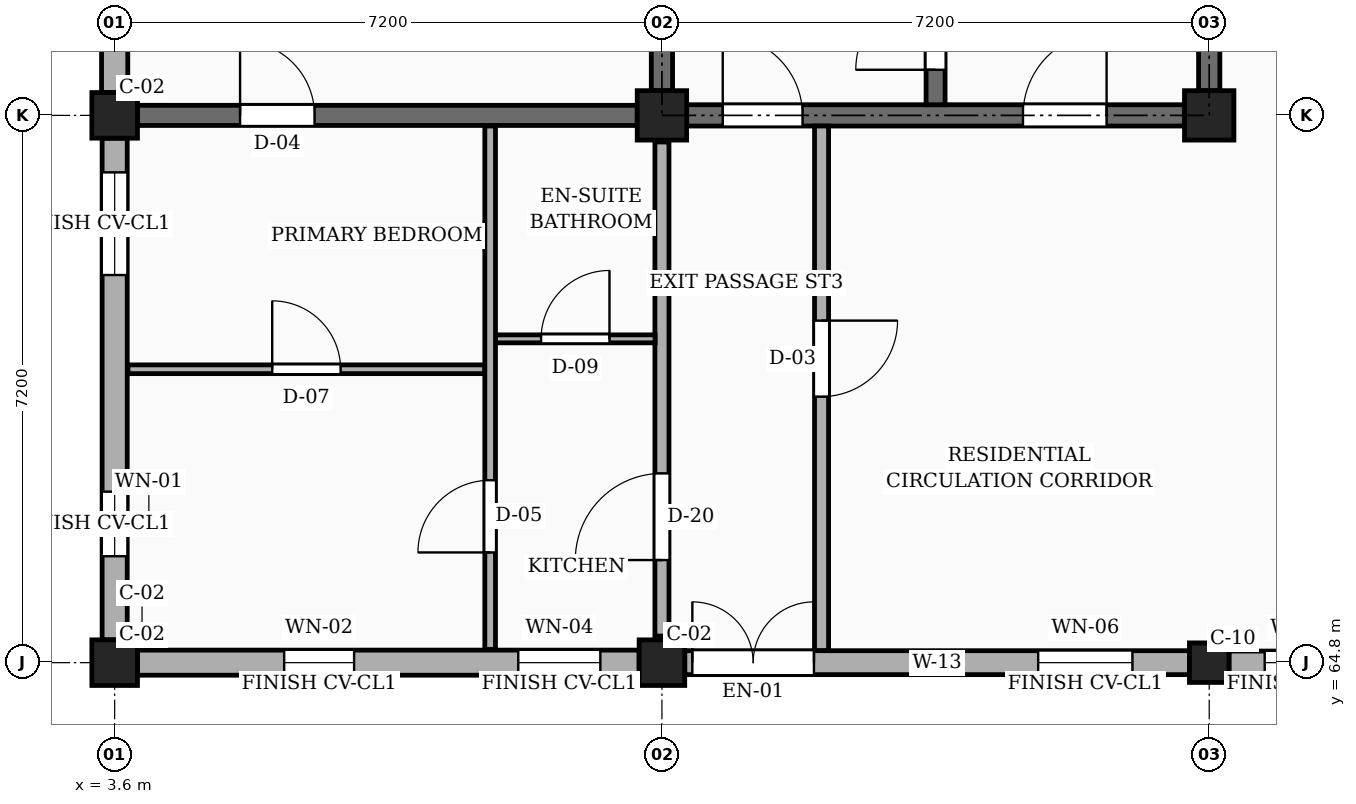
"""IFC4 building model, lengths in metres.
Left out: names, types, materials, properties, quantities, classifications, styles, units other than length and angle.
Written with IfcOpenShell. Run it as: python <this file> out.ifc"""

import sys

from ifc_helpers import new_model, si_unit, direction, frame, frame_2d, origin, origin_2d, place, context, subcontext, project, spatial, rectangle, circle, extrude, element, fill, save


model = new_model("IFC4")
c1 = context("Model", 3, precision=1e-05, world=origin(), true_north=direction((0.0, 1.0)))
c2 = subcontext(c1, "Body", "Model", "MODEL_VIEW")
j1 = project(units=[si_unit("LENGTHUNIT", "METRE"), si_unit("PLANEANGLEUNIT", "RADIAN")], contexts=[c1])
p1 = place(None, origin())
s1 = spatial("IfcSite", under=j1, at=p1, CompositionType="ELEMENT")
p2 = place(p1, origin())
s2 = spatial("IfcBuilding", under=s1, at=p2, CompositionType="ELEMENT")
p3 = place(p2, origin())
s3 = spatial("IfcBuildingStorey", under=s2, at=p3, CompositionType="ELEMENT", Elevation=0.0)
for number, where, z_axis, x_axis in (
    (1, (3.6, 64.8, 0.0), (0.0, 0.0, 1.0), (1.0, 0.0, 0.0)),
    (2, (3.6, 72.0, 0.0), (0.0, 0.0, 1.0), (1.0, 0.0, 0.0)),
    (3, (10.8, 64.8, 0.0), (0.0, 0.0, 1.0), (1.0, 0.0, 0.0)),
):
    element("IfcColumn", number, at=place(p3, frame(where, z_axis=z_axis, x_axis=x_axis)), inside=s3, PredefinedType="COLUMN", context=c2, shape_type="SweptSolid", body=[
        extrude(rectangle(XDim=0.6, YDim=0.6, at=origin_2d()), origin(), (0.0, 0.0, 1.0), 4.5),
    ])
p4 = place(p3, frame((10.8, 72.0, 0.0), z_axis=(0.0, 0.0, 1.0), x_axis=(1.0, 0.0, 0.0)))
e4 = element("IfcColumn", 4, at=p4, inside=s3, PredefinedType="COLUMN", context=c2, shape_type="SweptSolid", body=[
    extrude(rectangle(XDim=0.65, YDim=0.65, at=origin_2d()), origin(), (0.0, 0.0, 1.0), 4.5),
])
p5 = place(p3, frame((18.0, 64.8, 0.0), z_axis=(0.0, 0.0, 1.0), x_axis=(1.0, 0.0, 0.0)))
e5 = element("IfcColumn", 5, at=p5, inside=s3, PredefinedType="COLUMN", context=c2, shape_type="SweptSolid", body=[
    extrude(circle(Radius=0.26, at=origin_2d()), origin(), (0.0, 0.0, 1.0), 4.5),
])
p6 = place(p3, frame((18.0, 72.0, 0.0), z_axis=(0.0, 0.0, 1.0), x_axis=(1.0, 0.0, 0.0)))
e6 = element("IfcColumn", 6, at=p6, inside=s3, PredefinedType="COLUMN", context=c2, shape_type="SweptSolid", body=[
    extrude(rectangle(XDim=0.65, YDim=0.65, at=origin_2d()), origin(), (0.0, 0.0, 1.0), 4.5),
])
p7 = place(p3, frame((3.9, 72.0, 0.0), z_axis=(0.0, 0.0, 1.0), x_axis=(1.0, 0.0, 0.0)))
e7 = element("IfcWall", 7, at=p7, inside=s3, PredefinedType="SOLIDWALL", context=c2, shape_type="SweptSolid", body=[
    extrude(rectangle(XDim=6.575, YDim=0.265, at=frame_2d((3.288, 0.0))), origin(), (0.0, 0.0, 1.0), 3.56),
])
p8 = place(p7, frame((1.35, 0.0, 0.0)))
e8 = element("IfcOpeningElement", 8, at=p8, cuts=e7, PredefinedType="OPENING", context=c2, shape_type="SweptSolid", body=[
    extrude(rectangle(XDim=0.98, YDim=2.12, at=frame_2d((0.49, 1.06))), frame((0.0, 0.143, 0.0), z_axis=(0.0, -1.0, 0.0), x_axis=(1.0, 0.0, 0.0)), (0.0, 0.0, 1.0), 0.285),
])
p9 = place(p3, frame((3.9, 64.8, 0.0), z_axis=(0.0, 0.0, 1.0), x_axis=(1.0, 0.0, 0.0)))
e9 = element("IfcWall", 9, at=p9, inside=s3, PredefinedType="SOLIDWALL", context=c2, shape_type="SweptSolid", body=[
    extrude(rectangle(XDim=6.6, YDim=0.33, at=frame_2d((3.3, 0.0))), origin(), (0.0, 0.0, 1.0), 3.83),
])
p10 = place(p9, frame((1.93, 0.0, 0.78)))
e10 = element("IfcOpeningElement", 10, at=p10, cuts=e9, PredefinedType="OPENING", context=c2, shape_type="SweptSolid", body=[
    extrude(rectangle(XDim=0.92, YDim=1.15, at=frame_2d((0.46, 0.575))), frame((0.0, 0.175, 0.0), z_axis=(0.0, -1.0, 0.0), x_axis=(1.0, 0.0, 0.0)), (0.0, 0.0, 1.0), 0.35),
])
p11 = place(p9, frame((5.01, 0.0, 0.78)))
e11 = element("IfcOpeningElement", 11, at=p11, cuts=e9, PredefinedType="OPENING", context=c2, shape_type="SweptSolid", body=[
    extrude(rectangle(XDim=1.08, YDim=1.15, at=frame_2d((0.54, 0.575))), frame((0.0, 0.175, 0.0), z_axis=(0.0, -1.0, 0.0), x_axis=(1.0, 0.0, 0.0)), (0.0, 0.0, 1.0), 0.35),
])
p12 = place(p3, frame((11.1, 64.8, 0.0), z_axis=(0.0, 0.0, 1.0), x_axis=(1.0, 0.0, 0.0)))
e12 = element("IfcWall", 12, at=p12, inside=s3, PredefinedType="SOLIDWALL", context=c2, shape_type="SweptSolid", body=[
    extrude(rectangle(XDim=6.64, YDim=0.315, at=frame_2d((3.32, 0.0))), origin(), (0.0, 0.0, 1.0), 3.83),
])
p13 = place(p12, frame((4.65, 0.0, 0.78)))
e13 = element("IfcOpeningElement", 13, at=p13, cuts=e12, PredefinedType="OPENING", context=c2, shape_type="SweptSolid", body=[
    extrude(rectangle(XDim=1.24, YDim=1.15, at=frame_2d((0.62, 0.575))), frame((0.0, 0.167, 0.0), z_axis=(0.0, -1.0, 0.0), x_axis=(1.0, 0.0, 0.0)), (0.0, 0.0, 1.0), 0.335),
])
p14 = place(p12, frame((0.1, 0.0, 0.0)))
e14 = element("IfcOpeningElement", 14, at=p14, cuts=e12, PredefinedType="OPENING", context=c2, shape_type="SweptSolid", body=[
    extrude(rectangle(XDim=1.6, YDim=2.25, at=frame_2d((0.8, 1.125))), frame((0.0, 0.167, 0.0), z_axis=(0.0, -1.0, 0.0), x_axis=(1.0, 0.0, 0.0)), (0.0, 0.0, 1.0), 0.335),
])
p15 = place(p3, frame((18.26, 64.8, 0.0), z_axis=(0.0, 0.0, 1.0), x_axis=(1.0, 0.0, 0.0)))
e15 = element("IfcWall", 15, at=p15, inside=s3, PredefinedType="SOLIDWALL", context=c2, shape_type="SweptSolid", body=[
    extrude(rectangle(XDim=6.64, YDim=0.305, at=frame_2d((3.32, 0.0))), origin(), (0.0, 0.0, 1.0), 3.83),
])
p16 = place(p15, frame((0.47, 0.0, 0.78)))
e16 = element("IfcOpeningElement", 16, at=p16, cuts=e15, PredefinedType="OPENING", context=c2, shape_type="SweptSolid", body=[
    extrude(rectangle(XDim=1.04, YDim=1.26, at=frame_2d((0.52, 0.63))), frame((0.0, 0.163, 0.0), z_axis=(0.0, -1.0, 0.0), x_axis=(1.0, 0.0, 0.0)), (0.0, 0.0, 1.0), 0.325),
])
p17 = place(p15, frame((3.47, 0.0, 0.78)))
e17 = element("IfcOpeningElement", 17, at=p17, cuts=e15, PredefinedType="OPENING", context=c2, shape_type="SweptSolid", body=[
    extrude(rectangle(XDim=1.4, YDim=1.15, at=frame_2d((0.7, 0.575))), frame((0.0, 0.163, 0.0), z_axis=(0.0, -1.0, 0.0), x_axis=(1.0, 0.0, 0.0)), (0.0, 0.0, 1.0), 0.325),
])
p18 = place(p3, frame((3.6, 78.94, 0.0), z_axis=(0.0, 0.0, 1.0), x_axis=(0.0, -1.0, 0.0)))
e18 = element("IfcWall", 18, at=p18, inside=s3, PredefinedType="SOLIDWALL", context=c2, shape_type="SweptSolid", body=[
    extrude(rectangle(XDim=6.64, YDim=0.345, at=frame_2d((3.32, 0.0))), origin(), (0.0, 0.0, 1.0), 3.83),
])
p19 = place(p18, frame((0.45, 0.0, 0.78)))
e19 = element("IfcOpeningElement", 19, at=p19, cuts=e18, PredefinedType="OPENING", context=c2, shape_type="SweptSolid", body=[
    extrude(rectangle(XDim=1.15, YDim=1.44, at=frame_2d((0.575, 0.72))), frame((0.0, 0.183, 0.0), z_axis=(0.0, -1.0, 0.0), x_axis=(1.0, 0.0, 0.0)), (0.0, 0.0, 1.0), 0.365),
])
p20 = place(p18, frame((4.65, 0.0, 0.78)))
e20 = element("IfcOpeningElement", 20, at=p20, cuts=e18, PredefinedType="OPENING", context=c2, shape_type="SweptSolid", body=[
    extrude(rectangle(XDim=1.35, YDim=1.44, at=frame_2d((0.675, 0.72))), frame((0.0, 0.183, 0.0), z_axis=(0.0, -1.0, 0.0), x_axis=(1.0, 0.0, 0.0)), (0.0, 0.0, 1.0), 0.365),
])
p21 = place(p3, frame((3.6, 71.7, 0.0), z_axis=(0.0, 0.0, 1.0), x_axis=(0.0, -1.0, 0.0)))
e21 = element("IfcWall", 21, at=p21, inside=s3, PredefinedType="SOLIDWALL", context=c2, shape_type="SweptSolid", body=[
    extrude(rectangle(XDim=6.6, YDim=0.33, at=frame_2d((3.3, 0.0))), origin(), (0.0, 0.0, 1.0), 3.83),
])
p22 = place(p21, frame((0.45, 0.0, 0.78)))
e22 = element("IfcOpeningElement", 22, at=p22, cuts=e21, PredefinedType="OPENING", context=c2, shape_type="SweptSolid", body=[
    extrude(rectangle(XDim=1.35, YDim=1.44, at=frame_2d((0.675, 0.72))), frame((0.0, 0.175, 0.0), z_axis=(0.0, -1.0, 0.0), x_axis=(1.0, 0.0, 0.0)), (0.0, 0.0, 1.0), 0.35),
])
p23 = place(p21, frame((4.65, 0.0, 0.78)))
e23 = element("IfcOpeningElement", 23, at=p23, cuts=e21, PredefinedType="OPENING", context=c2, shape_type="SweptSolid", body=[
    extrude(rectangle(XDim=0.85, YDim=1.15, at=frame_2d((0.425, 0.575))), frame((0.0, 0.175, 0.0), z_axis=(0.0, -1.0, 0.0), x_axis=(1.0, 0.0, 0.0)), (0.0, 0.0, 1.0), 0.35),
])
p24 = place(p3, frame((10.8, 72.325, 0.0), z_axis=(0.0, 0.0, 1.0), x_axis=(0.0, 1.0, 0.0)))
e24 = element("IfcWall", 24, at=p24, inside=s3, PredefinedType="SHEAR", context=c2, shape_type="SweptSolid", body=[
    extrude(rectangle(XDim=6.55, YDim=0.28, at=frame_2d((3.275, 0.0))), origin(), (0.0, 0.0, 1.0), 4.26),
])
p25 = place(p3, frame((18.0, 72.325, 0.0), z_axis=(0.0, 0.0, 1.0), x_axis=(0.0, 1.0, 0.0)))
e25 = element("IfcWall", 25, at=p25, inside=s3, PredefinedType="SHEAR", context=c2, shape_type="SweptSolid", body=[
    extrude(rectangle(XDim=6.55, YDim=0.28, at=frame_2d((3.275, 0.0))), origin(), (0.0, 0.0, 1.0), 4.26),
])
p26 = place(p25, frame((1.5, 0.0, 0.0)))
e26 = element("IfcOpeningElement", 26, at=p26, cuts=e25, PredefinedType="OPENING", context=c2, shape_type="SweptSolid", body=[
    extrude(rectangle(XDim=1.1, YDim=2.15, at=frame_2d((0.55, 1.075))), frame((0.0, 0.15, 0.0), z_axis=(0.0, -1.0, 0.0), x_axis=(1.0, 0.0, 0.0)), (0.0, 0.0, 1.0), 0.3),
])
p27 = place(p3, frame((11.125, 72.0, 0.0), z_axis=(0.0, 0.0, 1.0), x_axis=(1.0, 0.0, 0.0)))
e27 = element("IfcWall", 27, at=p27, inside=s3, PredefinedType="SHEAR", context=c2, shape_type="SweptSolid", body=[
    extrude(rectangle(XDim=6.55, YDim=0.28, at=frame_2d((3.275, 0.0))), origin(), (0.0, 0.0, 1.0), 4.26),
])
p28 = place(p27, frame((4.425, 0.0, 0.0)))
e28 = element("IfcOpeningElement", 28, at=p28, cuts=e27, PredefinedType="OPENING", context=c2, shape_type="SweptSolid", body=[
    extrude(rectangle(XDim=1.1, YDim=2.15, at=frame_2d((0.55, 1.075))), frame((0.0, 0.15, 0.0), z_axis=(0.0, -1.0, 0.0), x_axis=(1.0, 0.0, 0.0)), (0.0, 0.0, 1.0), 0.3),
])
p29 = place(p27, frame((0.475, 0.0, 0.0)))
e29 = element("IfcOpeningElement", 29, at=p29, cuts=e27, PredefinedType="OPENING", context=c2, shape_type="SweptSolid", body=[
    extrude(rectangle(XDim=1.05, YDim=2.15, at=frame_2d((0.525, 1.075))), frame((0.0, 0.15, 0.0), z_axis=(0.0, -1.0, 0.0), x_axis=(1.0, 0.0, 0.0)), (0.0, 0.0, 1.0), 0.3),
])
p30 = place(p3, frame((14.4, 72.14, 0.0), z_axis=(0.0, 0.0, 1.0), x_axis=(0.0, 1.0, 0.0)))
e30 = element("IfcWall", 30, at=p30, inside=s3, PredefinedType="SHEAR", context=c2, shape_type="SweptSolid", body=[
    extrude(rectangle(XDim=6.92, YDim=0.25, at=frame_2d((3.46, 0.0))), origin(), (0.0, 0.0, 1.0), 4.26),
])
p31 = place(p30, frame((0.46, 0.0, 0.0)))
e31 = element("IfcOpeningElement", 31, at=p31, cuts=e30, PredefinedType="OPENING", context=c2, shape_type="SweptSolid", body=[
    extrude(rectangle(XDim=1.05, YDim=2.15, at=frame_2d((0.525, 1.075))), frame((0.0, 0.135, 0.0), z_axis=(0.0, -1.0, 0.0), x_axis=(1.0, 0.0, 0.0)), (0.0, 0.0, 1.0), 0.27),
])
p32 = place(p3, frame((10.8, 65.15, 0.0), z_axis=(0.0, 0.0, 1.0), x_axis=(0.0, 1.0, 0.0)))
e32 = element("IfcWall", 32, at=p32, inside=s3, PredefinedType="PARTITIONING", context=c2, shape_type="SweptSolid", body=[
    extrude(rectangle(XDim=6.5, YDim=0.185, at=frame_2d((3.25, 0.0))), origin(), (0.0, 0.0, 1.0), 3.51),
])
p33 = place(p32, frame((1.0, 0.0, 0.0)))
e33 = element("IfcOpeningElement", 33, at=p33, cuts=e32, PredefinedType="OPENING", context=c2, shape_type="SweptSolid", body=[
    extrude(rectangle(XDim=1.14, YDim=2.18, at=frame_2d((0.57, 1.09))), frame((0.0, 0.103, 0.0), z_axis=(0.0, -1.0, 0.0), x_axis=(1.0, 0.0, 0.0)), (0.0, 0.0, 1.0), 0.205),
])
p34 = place(p3, frame((3.775, 68.66, 0.0), z_axis=(0.0, 0.0, 1.0), x_axis=(1.0, 0.0, 0.0)))
e34 = element("IfcWall", 34, at=p34, inside=s3, PredefinedType="PARTITIONING", context=c2, shape_type="SweptSolid", body=[
    extrude(rectangle(XDim=4.695, YDim=0.115, at=frame_2d((2.348, 0.0))), origin(), (0.0, 0.0, 1.0), 3.695),
])
p35 = place(p34, frame((1.897, 0.0, 0.0)))
e35 = element("IfcOpeningElement", 35, at=p35, cuts=e34, PredefinedType="OPENING", context=c2, shape_type="SweptSolid", body=[
    extrude(rectangle(XDim=0.9, YDim=2.1, at=frame_2d((0.45, 1.05))), frame((0.0, 0.067, 0.0), z_axis=(0.0, -1.0, 0.0), x_axis=(1.0, 0.0, 0.0)), (0.0, 0.0, 1.0), 0.135),
])
p36 = place(p3, frame((8.61, 69.06, 0.0), z_axis=(0.0, 0.0, 1.0), x_axis=(1.0, 0.0, 0.0)))
e36 = element("IfcWall", 36, at=p36, inside=s3, PredefinedType="PARTITIONING", context=c2, shape_type="SweptSolid", body=[
    extrude(rectangle(XDim=2.1, YDim=0.105, at=frame_2d((1.05, 0.0))), origin(), (0.0, 0.0, 1.0), 3.695),
])
p37 = place(p36, frame((0.6, 0.0, 0.0)))
e37 = element("IfcOpeningElement", 37, at=p37, cuts=e36, PredefinedType="OPENING", context=c2, shape_type="SweptSolid", body=[
    extrude(rectangle(XDim=0.9, YDim=2.05, at=frame_2d((0.45, 1.025))), frame((0.0, 0.062, 0.0), z_axis=(0.0, -1.0, 0.0), x_axis=(1.0, 0.0, 0.0)), (0.0, 0.0, 1.0), 0.125),
])
p38 = place(p3, frame((8.54, 64.975, 0.0), z_axis=(0.0, 0.0, 1.0), x_axis=(0.0, 1.0, 0.0)))
e38 = element("IfcWall", 38, at=p38, inside=s3, PredefinedType="PARTITIONING", context=c2, shape_type="SweptSolid", body=[
    extrude(rectangle(XDim=6.885, YDim=0.14, at=frame_2d((3.442, 0.0))), origin(), (0.0, 0.0, 1.0), 3.695),
])
p39 = place(p38, frame((1.275, 0.0, 0.0)))
e39 = element("IfcOpeningElement", 39, at=p39, cuts=e38, PredefinedType="OPENING", context=c2, shape_type="SweptSolid", body=[
    extrude(rectangle(XDim=0.95, YDim=2.1, at=frame_2d((0.475, 1.05))), frame((0.0, 0.08, 0.0), z_axis=(0.0, -1.0, 0.0), x_axis=(1.0, 0.0, 0.0)), (0.0, 0.0, 1.0), 0.16),
])
p40 = place(p3, frame((12.9, 71.86, 0.0), z_axis=(0.0, 0.0, 1.0), x_axis=(0.0, -1.0, 0.0)))
e40 = element("IfcWall", 40, at=p40, inside=s3, PredefinedType="PARTITIONING", context=c2, shape_type="SweptSolid", body=[
    extrude(rectangle(XDim=6.9, YDim=0.185, at=frame_2d((3.45, 0.0))), origin(), (0.0, 0.0, 1.0), 3.695),
])
p41 = place(p40, frame((2.56, 0.0, 0.0)))
e41 = element("IfcOpeningElement", 41, at=p41, cuts=e40, PredefinedType="OPENING", context=c2, shape_type="SweptSolid", body=[
    extrude(rectangle(XDim=1.0, YDim=2.15, at=frame_2d((0.5, 1.075))), frame((0.0, 0.103, 0.0), z_axis=(0.0, -1.0, 0.0), x_axis=(1.0, 0.0, 0.0)), (0.0, 0.0, 1.0), 0.205),
])
p42 = place(p10, origin())
e42 = element("IfcWindow", 42, at=p42, inside=s3, PartitioningType="SINGLE_PANEL", PredefinedType="WINDOW", context=c2, shape_type="SweptSolid", body=[
    extrude(rectangle(XDim=0.92, YDim=1.15, at=frame_2d((0.46, 0.575))), frame((0.0, 0.03, 0.0), z_axis=(0.0, -1.0, 0.0), x_axis=(1.0, 0.0, 0.0)), (0.0, 0.0, 1.0), 0.06),
])
fill(e10, e42)
p43 = place(p11, origin())
e43 = element("IfcWindow", 43, at=p43, inside=s3, PartitioningType="SINGLE_PANEL", PredefinedType="WINDOW", context=c2, shape_type="SweptSolid", body=[
    extrude(rectangle(XDim=1.08, YDim=1.15, at=frame_2d((0.54, 0.575))), frame((0.0, 0.03, 0.0), z_axis=(0.0, -1.0, 0.0), x_axis=(1.0, 0.0, 0.0)), (0.0, 0.0, 1.0), 0.06),
])
fill(e11, e43)
p44 = place(p13, origin())
e44 = element("IfcWindow", 44, at=p44, inside=s3, PartitioningType="SINGLE_PANEL", PredefinedType="WINDOW", context=c2, shape_type="SweptSolid", body=[
    extrude(rectangle(XDim=1.24, YDim=1.15, at=frame_2d((0.62, 0.575))), frame((0.0, 0.03, 0.0), z_axis=(0.0, -1.0, 0.0), x_axis=(1.0, 0.0, 0.0)), (0.0, 0.0, 1.0), 0.06),
])
fill(e13, e44)
p45 = place(p16, origin())
e45 = element("IfcWindow", 45, at=p45, inside=s3, PartitioningType="SINGLE_PANEL", PredefinedType="WINDOW", context=c2, shape_type="SweptSolid", body=[
    extrude(rectangle(XDim=1.04, YDim=1.26, at=frame_2d((0.52, 0.63))), frame((0.0, 0.03, 0.0), z_axis=(0.0, -1.0, 0.0), x_axis=(1.0, 0.0, 0.0)), (0.0, 0.0, 1.0), 0.06),
])
fill(e16, e45)
p46 = place(p22, origin())
e46 = element("IfcWindow", 46, at=p46, inside=s3, PartitioningType="SINGLE_PANEL", PredefinedType="WINDOW", context=c2, shape_type="SweptSolid", body=[
    extrude(rectangle(XDim=1.35, YDim=1.44, at=frame_2d((0.675, 0.72))), frame((0.0, 0.03, 0.0), z_axis=(0.0, -1.0, 0.0), x_axis=(1.0, 0.0, 0.0)), (0.0, 0.0, 1.0), 0.06),
])
fill(e22, e46)
p47 = place(p23, origin())
e47 = element("IfcWindow", 47, at=p47, inside=s3, PartitioningType="SINGLE_PANEL", PredefinedType="WINDOW", context=c2, shape_type="SweptSolid", body=[
    extrude(rectangle(XDim=0.85, YDim=1.15, at=frame_2d((0.425, 0.575))), frame((0.0, 0.03, 0.0), z_axis=(0.0, -1.0, 0.0), x_axis=(1.0, 0.0, 0.0)), (0.0, 0.0, 1.0), 0.06),
])
fill(e23, e47)
p48 = place(p28, frame((1.1, 0.0, 0.0), z_axis=(0.0, 0.0, 1.0), x_axis=(-1.0, 0.0, 0.0)))
e48 = element("IfcDoor", 48, at=p48, inside=s3, OperationType="SINGLE_SWING_RIGHT", PredefinedType="DOOR", context=c2, shape_type="SweptSolid", body=[
    extrude(rectangle(XDim=1.1, YDim=2.15, at=frame_2d((0.55, 1.075))), frame((0.0, 0.025, 0.0), z_axis=(0.0, -1.0, 0.0), x_axis=(1.0, 0.0, 0.0)), (0.0, 0.0, 1.0), 0.05),
])
fill(e28, e48)
p49 = place(p31, frame((1.05, 0.0, 0.0), z_axis=(0.0, 0.0, 1.0), x_axis=(-1.0, 0.0, 0.0)))
e49 = element("IfcDoor", 49, at=p49, inside=s3, OperationType="SINGLE_SWING_LEFT", PredefinedType="DOOR", context=c2, shape_type="SweptSolid", body=[
    extrude(rectangle(XDim=1.05, YDim=2.15, at=frame_2d((0.525, 1.075))), frame((0.0, 0.025, 0.0), z_axis=(0.0, -1.0, 0.0), x_axis=(1.0, 0.0, 0.0)), (0.0, 0.0, 1.0), 0.05),
])
fill(e31, e49)
p50 = place(p33, origin())
e50 = element("IfcDoor", 50, at=p50, inside=s3, OperationType="SINGLE_SWING_LEFT", PredefinedType="DOOR", context=c2, shape_type="SweptSolid", body=[
    extrude(rectangle(XDim=1.14, YDim=2.18, at=frame_2d((0.57, 1.09))), frame((0.0, 0.025, 0.0), z_axis=(0.0, -1.0, 0.0), x_axis=(1.0, 0.0, 0.0)), (0.0, 0.0, 1.0), 0.05),
])
fill(e33, e50)
p51 = place(p35, origin())
e51 = element("IfcDoor", 51, at=p51, inside=s3, OperationType="SINGLE_SWING_LEFT", PredefinedType="DOOR", context=c2, shape_type="SweptSolid", body=[
    extrude(rectangle(XDim=0.9, YDim=2.1, at=frame_2d((0.45, 1.05))), frame((0.0, 0.025, 0.0), z_axis=(0.0, -1.0, 0.0), x_axis=(1.0, 0.0, 0.0)), (0.0, 0.0, 1.0), 0.05),
])
fill(e35, e51)
p52 = place(p37, origin())
e52 = element("IfcDoor", 52, at=p52, inside=s3, OperationType="SINGLE_SWING_RIGHT", PredefinedType="DOOR", context=c2, shape_type="SweptSolid", body=[
    extrude(rectangle(XDim=0.9, YDim=2.05, at=frame_2d((0.45, 1.025))), frame((0.0, 0.025, 0.0), z_axis=(0.0, -1.0, 0.0), x_axis=(1.0, 0.0, 0.0)), (0.0, 0.0, 1.0), 0.05),
])
fill(e37, e52)
p53 = place(p39, origin())
e53 = element("IfcDoor", 53, at=p53, inside=s3, OperationType="SINGLE_SWING_LEFT", PredefinedType="DOOR", context=c2, shape_type="SweptSolid", body=[
    extrude(rectangle(XDim=0.95, YDim=2.1, at=frame_2d((0.475, 1.05))), frame((0.0, 0.025, 0.0), z_axis=(0.0, -1.0, 0.0), x_axis=(1.0, 0.0, 0.0)), (0.0, 0.0, 1.0), 0.05),
])
fill(e39, e53)
p54 = place(p8, origin())
e54 = element("IfcDoor", 54, at=p54, inside=s3, OperationType="SINGLE_SWING_LEFT", PredefinedType="DOOR", context=c2, shape_type="SweptSolid", body=[
    extrude(rectangle(XDim=0.98, YDim=2.12, at=frame_2d((0.49, 1.06))), frame((0.0, 0.025, 0.0), z_axis=(0.0, -1.0, 0.0), x_axis=(1.0, 0.0, 0.0)), (0.0, 0.0, 1.0), 0.05),
])
fill(e8, e54)
p55 = place(p29, frame((1.05, 0.0, 0.0), z_axis=(0.0, 0.0, 1.0), x_axis=(-1.0, 0.0, 0.0)))
e55 = element("IfcDoor", 55, at=p55, inside=s3, OperationType="SINGLE_SWING_LEFT", PredefinedType="DOOR", context=c2, shape_type="SweptSolid", body=[
    extrude(rectangle(XDim=1.05, YDim=2.15, at=frame_2d((0.525, 1.075))), frame((0.0, 0.025, 0.0), z_axis=(0.0, -1.0, 0.0), x_axis=(1.0, 0.0, 0.0)), (0.0, 0.0, 1.0), 0.05),
])
fill(e29, e55)
p56 = place(p14, frame((1.6, 0.0, 0.0), z_axis=(0.0, 0.0, 1.0), x_axis=(-1.0, 0.0, 0.0)))
e56 = element("IfcDoor", 56, at=p56, inside=s3, OperationType="DOUBLE_DOOR_SINGLE_SWING", PredefinedType="DOOR", context=c2, shape_type="SweptSolid", body=[
    extrude(rectangle(XDim=1.6, YDim=2.25, at=frame_2d((0.8, 1.125))), frame((0.0, 0.025, 0.0), z_axis=(0.0, -1.0, 0.0), x_axis=(1.0, 0.0, 0.0)), (0.0, 0.0, 1.0), 0.05),
])
fill(e14, e56)
p57 = place(p41, origin())
e57 = element("IfcDoor", 57, at=p57, inside=s3, OperationType="SINGLE_SWING_LEFT", PredefinedType="DOOR", context=c2, shape_type="SweptSolid", body=[
    extrude(rectangle(XDim=1.0, YDim=2.15, at=frame_2d((0.5, 1.075))), frame((0.0, 0.025, 0.0), z_axis=(0.0, -1.0, 0.0), x_axis=(1.0, 0.0, 0.0)), (0.0, 0.0, 1.0), 0.05),
])
fill(e41, e57)
save(model, sys.argv[1])
